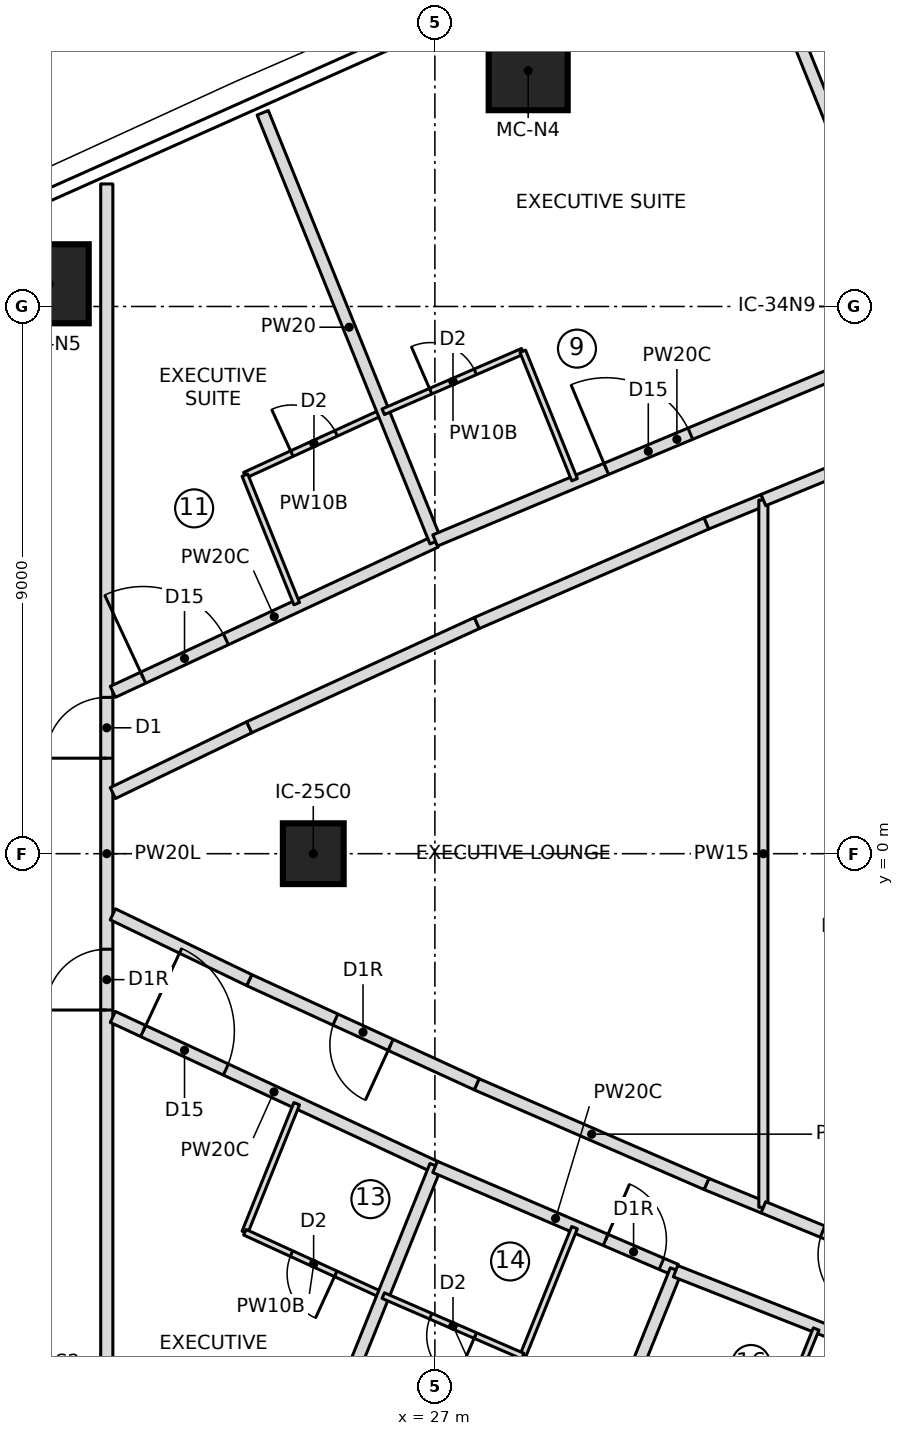
"""IFC4 building model, lengths in metres.
Left out: names, types, materials, properties, quantities, classifications, styles, units other than length and angle.
Written with IfcOpenShell. Run it as: python <this file> out.ifc"""

import sys

from ifc_helpers import new_model, si_unit, direction, frame, frame_2d, origin, origin_2d, place, context, subcontext, project, spatial, rectangle, extrude, element, fill, save


model = new_model("IFC4")
c1 = context("Model", 3, precision=1e-05, world=origin(), true_north=direction((0.0, 1.0)))
c2 = subcontext(c1, "Body", "Model", "MODEL_VIEW")
j1 = project(units=[si_unit("LENGTHUNIT", "METRE"), si_unit("PLANEANGLEUNIT", "RADIAN")], contexts=[c1])
p1 = place(None, origin())
s1 = spatial("IfcSite", under=j1, at=p1, CompositionType="ELEMENT")
p2 = place(p1, origin())
s2 = spatial("IfcBuilding", under=s1, at=p2, CompositionType="ELEMENT")
p3 = place(p2, frame((0.0, 0.0, 200.35)))
s3 = spatial("IfcBuildingStorey", under=s2, at=p3, CompositionType="ELEMENT", Elevation=200.35)
for number, where, z_axis, x_axis in (
    (1, (28.534, 12.878, 0.0), (0.0, 0.0, 1.0), (1.0, 0.0, 0.0)),
    (2, (20.657, 9.373, 0.0), (0.0, 0.0, 1.0), (1.0, 0.0, 0.0)),
):
    element("IfcColumn", number, at=place(p3, frame(where, z_axis=z_axis, x_axis=x_axis)), inside=s3, PredefinedType="COLUMN", context=c2, shape_type="SweptSolid", body=[
        extrude(rectangle(XDim=1.3, YDim=1.3, at=origin_2d()), origin(), (0.0, 0.0, 1.0), 3.55),
    ])
p4 = place(p3, frame((25.0, 0.0, 0.0), z_axis=(0.0, 0.0, 1.0), x_axis=(1.0, 0.0, 0.0)))
e3 = element("IfcColumn", 3, at=p4, inside=s3, PredefinedType="COLUMN", context=c2, shape_type="SweptSolid", body=[
    extrude(rectangle(XDim=1.0, YDim=1.0, at=origin_2d()), origin(), (0.0, 0.0, 1.0), 3.55),
])
p5 = place(p3, frame((21.604, -11.015, 0.0), z_axis=(0.0, 0.0, 1.0), x_axis=(0.0, 1.0, 0.0)))
e4 = element("IfcWall", 4, at=p5, inside=s3, PredefinedType="PARTITIONING", context=c2, shape_type="SweptSolid", body=[
    extrude(rectangle(XDim=22.031, YDim=0.2, at=frame_2d((11.015, 0.0))), origin(), (0.0, 0.0, 1.0), 3.25),
])
p6 = place(p5, frame((12.586, 0.0, 0.0)))
e5 = element("IfcOpeningElement", 5, at=p6, cuts=e4, PredefinedType="OPENING", context=c2, shape_type="SweptSolid", body=[
    extrude(rectangle(XDim=1.0, YDim=2.1, at=frame_2d((0.5, 1.05))), frame((0.0, 0.11, 0.0), z_axis=(0.0, -1.0, 0.0), x_axis=(1.0, 0.0, 0.0)), (0.0, 0.0, 1.0), 0.22),
])
p7 = place(p5, frame((8.444, 0.0, 0.0)))
e6 = element("IfcOpeningElement", 6, at=p7, cuts=e4, PredefinedType="OPENING", context=c2, shape_type="SweptSolid", body=[
    extrude(rectangle(XDim=1.0, YDim=2.1, at=frame_2d((0.5, 1.05))), frame((0.0, 0.11, 0.0), z_axis=(0.0, -1.0, 0.0), x_axis=(1.0, 0.0, 0.0)), (0.0, 0.0, 1.0), 0.22),
])
p8 = place(p3, frame((21.704, 2.663, 0.0), z_axis=(0.0, 0.0, 1.0), x_axis=(0.906619470853, 0.421949209112, 0.0)))
e7 = element("IfcWall", 7, at=p8, inside=s3, PredefinedType="PARTITIONING", context=c2, shape_type="SweptSolid", body=[
    extrude(rectangle(XDim=5.854, YDim=0.2, at=frame_2d((2.927, 0.0))), origin(), (0.0, 0.0, 1.0), 3.25),
])
p9 = place(p8, frame((0.55, 0.0, 0.0)))
e8 = element("IfcOpeningElement", 8, at=p9, cuts=e7, PredefinedType="OPENING", context=c2, shape_type="SweptSolid", body=[
    extrude(rectangle(XDim=1.5, YDim=2.1, at=frame_2d((0.75, 1.05))), frame((0.0, 0.11, 0.0), z_axis=(0.0, -1.0, 0.0), x_axis=(1.0, 0.0, 0.0)), (0.0, 0.0, 1.0), 0.22),
])
p10 = place(p3, frame((23.875, 6.226, 0.0), z_axis=(0.0, 0.0, 1.0), x_axis=(0.909145169949, 0.416479363183, 0.0)))
e9 = element("IfcWall", 9, at=p10, inside=s3, PredefinedType="PARTITIONING", context=c2, shape_type="SweptSolid", body=[
    extrude(rectangle(XDim=2.493, YDim=0.1, at=frame_2d((1.247, 0.0))), origin(), (0.0, 0.0, 1.0), 3.25),
])
p11 = place(p10, frame((0.85, 0.0, 0.0)))
e10 = element("IfcOpeningElement", 10, at=p11, cuts=e9, PredefinedType="OPENING", context=c2, shape_type="SweptSolid", body=[
    extrude(rectangle(XDim=0.8, YDim=2.1, at=frame_2d((0.4, 1.05))), frame((0.0, 0.06, 0.0), z_axis=(0.0, -1.0, 0.0), x_axis=(1.0, 0.0, 0.0)), (0.0, 0.0, 1.0), 0.12),
])
p12 = place(p3, frame((24.728, 4.112, 0.0), z_axis=(0.0, 0.0, 1.0), x_axis=(-0.373790023037, 0.927513352291, 0.0)))
e11 = element("IfcWall", 11, at=p12, inside=s3, PredefinedType="PARTITIONING", context=c2, shape_type="SweptSolid", body=[
    extrude(rectangle(XDim=2.28, YDim=0.1, at=frame_2d((1.14, 0.0))), origin(), (0.0, 0.0, 1.0), 3.25),
])
p13 = place(p3, frame((27.012, 5.133, 0.0), z_axis=(0.0, 0.0, 1.0), x_axis=(-0.373913547423, 0.927463562116, 0.0)))
e12 = element("IfcWall", 12, at=p13, inside=s3, PredefinedType="PARTITIONING", context=c2, shape_type="SweptSolid", body=[
    extrude(rectangle(XDim=7.604, YDim=0.2, at=frame_2d((3.802, 0.0))), origin(), (0.0, 0.0, 1.0), 3.25),
])
p14 = place(p3, frame((27.004, 5.151, 0.0), z_axis=(0.0, 0.0, 1.0), x_axis=(0.922490953728, 0.386018704586, 0.0)))
e13 = element("IfcWall", 13, at=p14, inside=s3, PredefinedType="PARTITIONING", context=c2, shape_type="SweptSolid", body=[
    extrude(rectangle(XDim=8.62, YDim=0.2, at=frame_2d((4.31, 0.0))), origin(), (0.0, 0.0, 1.0), 3.25),
])
p15 = place(p14, frame((3.05, 0.0, 0.0)))
e14 = element("IfcOpeningElement", 14, at=p15, cuts=e13, PredefinedType="OPENING", context=c2, shape_type="SweptSolid", body=[
    extrude(rectangle(XDim=1.5, YDim=2.1, at=frame_2d((0.75, 1.05))), frame((0.0, 0.11, 0.0), z_axis=(0.0, -1.0, 0.0), x_axis=(1.0, 0.0, 0.0)), (0.0, 0.0, 1.0), 0.22),
])
p16 = place(p3, frame((26.151, 7.268, 0.0), z_axis=(0.0, 0.0, 1.0), x_axis=(0.917378641232, 0.398015613526, 0.0)))
e15 = element("IfcWall", 15, at=p16, inside=s3, PredefinedType="PARTITIONING", context=c2, shape_type="SweptSolid", body=[
    extrude(rectangle(XDim=2.501, YDim=0.1, at=frame_2d((1.25, 0.0))), origin(), (0.0, 0.0, 1.0), 3.25),
])
p17 = place(p16, frame((0.85, 0.0, 0.0)))
e16 = element("IfcOpeningElement", 16, at=p17, cuts=e15, PredefinedType="OPENING", context=c2, shape_type="SweptSolid", body=[
    extrude(rectangle(XDim=0.8, YDim=2.1, at=frame_2d((0.4, 1.05))), frame((0.0, 0.06, 0.0), z_axis=(0.0, -1.0, 0.0), x_axis=(1.0, 0.0, 0.0)), (0.0, 0.0, 1.0), 0.12),
])
p18 = place(p3, frame((28.445, 8.263, 0.0), z_axis=(0.0, 0.0, 1.0), x_axis=(0.373902898623, -0.927467855185, 0.0)))
e17 = element("IfcWall", 17, at=p18, inside=s3, PredefinedType="PARTITIONING", context=c2, shape_type="SweptSolid", body=[
    extrude(rectangle(XDim=2.278, YDim=0.1, at=frame_2d((1.139, 0.0))), origin(), (0.0, 0.0, 1.0), 3.25),
])
p19 = place(p3, frame((34.956, 8.479, 0.0), z_axis=(0.0, 0.0, 1.0), x_axis=(-0.373881438439, 0.927476506436, 0.0)))
e18 = element("IfcWall", 18, at=p19, inside=s3, PredefinedType="PARTITIONING", context=c2, shape_type="SweptSolid", body=[
    extrude(rectangle(XDim=7.601, YDim=0.2, at=frame_2d((3.8, 0.0))), origin(), (0.0, 0.0, 1.0), 3.25),
])
p20 = place(p3, frame((21.704, -2.685, 0.0), z_axis=(0.0, 0.0, 1.0), x_axis=(0.906628613993, -0.421929563184, 0.0)))
e19 = element("IfcWall", 19, at=p20, inside=s3, PredefinedType="PARTITIONING", context=c2, shape_type="SweptSolid", body=[
    extrude(rectangle(XDim=5.846, YDim=0.2, at=frame_2d((2.923, 0.0))), origin(), (0.0, 0.0, 1.0), 3.25),
])
p21 = place(p20, frame((0.55, 0.0, 0.0)))
e20 = element("IfcOpeningElement", 20, at=p21, cuts=e19, PredefinedType="OPENING", context=c2, shape_type="SweptSolid", body=[
    extrude(rectangle(XDim=1.5, YDim=2.1, at=frame_2d((0.75, 1.05))), frame((0.0, 0.11, 0.0), z_axis=(0.0, -1.0, 0.0), x_axis=(1.0, 0.0, 0.0)), (0.0, 0.0, 1.0), 0.22),
])
p22 = place(p3, frame((23.875, -6.226, 0.0), z_axis=(0.0, 0.0, 1.0), x_axis=(0.373790023037, 0.927513352291, 0.0)))
e21 = element("IfcWall", 21, at=p22, inside=s3, PredefinedType="PARTITIONING", context=c2, shape_type="SweptSolid", body=[
    extrude(rectangle(XDim=2.28, YDim=0.1, at=frame_2d((1.14, 0.0))), origin(), (0.0, 0.0, 1.0), 3.25),
])
p23 = place(p3, frame((26.142, -7.264, 0.0), z_axis=(0.0, 0.0, 1.0), x_axis=(-0.909145169949, 0.416479363183, 0.0)))
e22 = element("IfcWall", 22, at=p23, inside=s3, PredefinedType="PARTITIONING", context=c2, shape_type="SweptSolid", body=[
    extrude(rectangle(XDim=2.493, YDim=0.1, at=frame_2d((1.247, 0.0))), origin(), (0.0, 0.0, 1.0), 3.25),
])
p24 = place(p23, frame((0.85, 0.0, 0.0)))
e23 = element("IfcOpeningElement", 23, at=p24, cuts=e22, PredefinedType="OPENING", context=c2, shape_type="SweptSolid", body=[
    extrude(rectangle(XDim=0.8, YDim=2.1, at=frame_2d((0.4, 1.05))), frame((0.0, 0.06, 0.0), z_axis=(0.0, -1.0, 0.0), x_axis=(1.0, 0.0, 0.0)), (0.0, 0.0, 1.0), 0.12),
])
p25 = place(p3, frame((24.168, -12.185, 0.0), z_axis=(0.0, 0.0, 1.0), x_axis=(0.373913547423, 0.927463562116, 0.0)))
e24 = element("IfcWall", 24, at=p25, inside=s3, PredefinedType="PARTITIONING", context=c2, shape_type="SweptSolid", body=[
    extrude(rectangle(XDim=7.604, YDim=0.2, at=frame_2d((3.802, 0.0))), origin(), (0.0, 0.0, 1.0), 3.25),
])
p26 = place(p3, frame((27.004, -5.151, 0.0), z_axis=(0.0, 0.0, 1.0), x_axis=(0.919259282109, -0.393652603519, 0.0)))
e25 = element("IfcWall", 25, at=p26, inside=s3, PredefinedType="PARTITIONING", context=c2, shape_type="SweptSolid", body=[
    extrude(rectangle(XDim=4.309, YDim=0.2, at=frame_2d((2.155, 0.0))), origin(), (0.0, 0.0, 1.0), 3.25),
])
p27 = place(p26, frame((3.05, 0.0, 0.0)))
e26 = element("IfcOpeningElement", 26, at=p27, cuts=e25, PredefinedType="OPENING", context=c2, shape_type="SweptSolid", body=[
    extrude(rectangle(XDim=1.0, YDim=2.1, at=frame_2d((0.5, 1.05))), frame((0.0, 0.11, 0.0), z_axis=(0.0, -1.0, 0.0), x_axis=(1.0, 0.0, 0.0)), (0.0, 0.0, 1.0), 0.22),
])
p28 = place(p3, frame((29.297, -6.151, 0.0), z_axis=(0.0, 0.0, 1.0), x_axis=(-0.373902898623, -0.927467855185, 0.0)))
e27 = element("IfcWall", 27, at=p28, inside=s3, PredefinedType="PARTITIONING", context=c2, shape_type="SweptSolid", body=[
    extrude(rectangle(XDim=2.278, YDim=0.1, at=frame_2d((1.139, 0.0))), origin(), (0.0, 0.0, 1.0), 3.25),
])
p29 = place(p3, frame((28.445, -8.263, 0.0), z_axis=(0.0, 0.0, 1.0), x_axis=(-0.917378641232, 0.398015613526, 0.0)))
e28 = element("IfcWall", 28, at=p29, inside=s3, PredefinedType="PARTITIONING", context=c2, shape_type="SweptSolid", body=[
    extrude(rectangle(XDim=2.501, YDim=0.1, at=frame_2d((1.25, 0.0))), origin(), (0.0, 0.0, 1.0), 3.25),
])
p30 = place(p29, frame((0.85, 0.0, 0.0)))
e29 = element("IfcOpeningElement", 29, at=p30, cuts=e28, PredefinedType="OPENING", context=c2, shape_type="SweptSolid", body=[
    extrude(rectangle(XDim=0.8, YDim=2.1, at=frame_2d((0.4, 1.05))), frame((0.0, 0.06, 0.0), z_axis=(0.0, -1.0, 0.0), x_axis=(1.0, 0.0, 0.0)), (0.0, 0.0, 1.0), 0.12),
])
p31 = place(p3, frame((28.124, -13.897, 0.0), z_axis=(0.0, 0.0, 1.0), x_axis=(0.373876084216, 0.927478664796, 0.0)))
e30 = element("IfcWall", 30, at=p31, inside=s3, PredefinedType="PARTITIONING", context=c2, shape_type="SweptSolid", body=[
    extrude(rectangle(XDim=7.6, YDim=0.2, at=frame_2d((3.8, 0.0))), origin(), (0.0, 0.0, 1.0), 3.25),
])
p32 = place(p3, frame((30.958, -6.866, 0.0), z_axis=(0.0, 0.0, 1.0), x_axis=(0.93040517394, -0.366532689274, 0.0)))
e31 = element("IfcWall", 31, at=p32, inside=s3, PredefinedType="PARTITIONING", context=c2, shape_type="SweptSolid", body=[
    extrude(rectangle(XDim=8.622, YDim=0.2, at=frame_2d((4.311, 0.0))), origin(), (0.0, 0.0, 1.0), 3.25),
])
p33 = place(p32, frame((4.25, 0.0, 0.0)))
e32 = element("IfcOpeningElement", 32, at=p33, cuts=e31, PredefinedType="OPENING", context=c2, shape_type="SweptSolid", body=[
    extrude(rectangle(XDim=1.5, YDim=2.1, at=frame_2d((0.75, 1.05))), frame((0.0, 0.11, 0.0), z_axis=(0.0, -1.0, 0.0), x_axis=(1.0, 0.0, 0.0)), (0.0, 0.0, 1.0), 0.22),
])
p34 = place(p3, frame((33.27, -7.818, 0.0), z_axis=(0.0, 0.0, 1.0), x_axis=(-0.373847853912, -0.927490044219, 0.0)))
e33 = element("IfcWall", 33, at=p34, inside=s3, PredefinedType="PARTITIONING", context=c2, shape_type="SweptSolid", body=[
    extrude(rectangle(XDim=2.277, YDim=0.1, at=frame_2d((1.139, 0.0))), origin(), (0.0, 0.0, 1.0), 3.25),
])
p35 = place(p3, frame((27.69, -3.793, 0.0), z_axis=(0.0, 0.0, 1.0), x_axis=(-0.909180834404, 0.416401501382, 0.0)))
e34 = element("IfcWall", 34, at=p35, inside=s3, PredefinedType="PARTITIONING", context=c2, shape_type="SweptSolid", body=[
    extrude(rectangle(XDim=4.117, YDim=0.2, at=frame_2d((2.059, 0.0))), origin(), (0.0, 0.0, 1.0), 3.25),
])
p36 = place(p35, frame((1.559, 0.0, 0.0)))
e35 = element("IfcOpeningElement", 35, at=p36, cuts=e34, PredefinedType="OPENING", context=c2, shape_type="SweptSolid", body=[
    extrude(rectangle(XDim=1.0, YDim=2.1, at=frame_2d((0.5, 1.05))), frame((0.0, 0.11, 0.0), z_axis=(0.0, -1.0, 0.0), x_axis=(1.0, 0.0, 0.0)), (0.0, 0.0, 1.0), 0.22),
])
p37 = place(p3, frame((32.402, -5.816, 0.0), z_axis=(0.0, 0.0, 1.0), x_axis=(-0.925212079844, 0.379450401648, 0.0)))
e36 = element("IfcWall", 36, at=p37, inside=s3, PredefinedType="PARTITIONING", context=c2, shape_type="SweptSolid", body=[
    extrude(rectangle(XDim=1.011, YDim=0.2, at=frame_2d((0.506, 0.0))), origin(), (0.0, 0.0, 1.0), 3.25),
])
p38 = place(p3, frame((31.467, -5.432, 0.0), z_axis=(0.0, 0.0, 1.0), x_axis=(-0.917375244839, 0.398023441717, 0.0)))
e37 = element("IfcWall", 37, at=p38, inside=s3, PredefinedType="PARTITIONING", context=c2, shape_type="SweptSolid", body=[
    extrude(rectangle(XDim=4.117, YDim=0.2, at=frame_2d((2.059, 0.0))), origin(), (0.0, 0.0, 1.0), 3.25),
])
for number, where, z_axis, x_axis in (
    (38, (23.947, -2.079, 0.0), (0.0, 0.0, 1.0), (-0.901, 0.435, 0.0)),
    (39, (21.704, 0.997, 0.0), (0.0, 0.0, 1.0), (0.901, 0.435, 0.0)),
):
    element("IfcWall", number, at=place(p3, frame(where, z_axis=z_axis, x_axis=x_axis)), inside=s3, PredefinedType="PARTITIONING", context=c2, shape_type="SweptSolid", body=[
        extrude(rectangle(XDim=2.49, YDim=0.2, at=frame_2d((1.245, 0.0))), origin(), (0.0, 0.0, 1.0), 3.25),
    ])
p39 = place(p3, frame((23.947, 2.079, 0.0), z_axis=(0.0, 0.0, 1.0), x_axis=(0.909180834404, 0.416401501382, 0.0)))
e40 = element("IfcWall", 40, at=p39, inside=s3, PredefinedType="PARTITIONING", context=c2, shape_type="SweptSolid", body=[
    extrude(rectangle(XDim=4.117, YDim=0.2, at=frame_2d((2.059, 0.0))), origin(), (0.0, 0.0, 1.0), 3.25),
])
p40 = place(p3, frame((27.69, 3.793, 0.0), z_axis=(0.0, 0.0, 1.0), x_axis=(0.917375244839, 0.398023441717, 0.0)))
e41 = element("IfcWall", 41, at=p40, inside=s3, PredefinedType="PARTITIONING", context=c2, shape_type="SweptSolid", body=[
    extrude(rectangle(XDim=4.117, YDim=0.2, at=frame_2d((2.059, 0.0))), origin(), (0.0, 0.0, 1.0), 3.25),
])
p41 = place(p3, frame((31.467, 5.432, 0.0), z_axis=(0.0, 0.0, 1.0), x_axis=(0.925212079844, 0.379450401648, 0.0)))
e42 = element("IfcWall", 42, at=p41, inside=s3, PredefinedType="PARTITIONING", context=c2, shape_type="SweptSolid", body=[
    extrude(rectangle(XDim=1.011, YDim=0.2, at=frame_2d((0.506, 0.0))), origin(), (0.0, 0.0, 1.0), 3.25),
])
p42 = place(p3, frame((32.402, -5.816, 0.0), z_axis=(0.0, 0.0, 1.0), x_axis=(0.0, 1.0, 0.0)))
e43 = element("IfcWall", 43, at=p42, inside=s3, PredefinedType="PARTITIONING", context=c2, shape_type="SweptSolid", body=[
    extrude(rectangle(XDim=11.632, YDim=0.15, at=frame_2d((5.816, 0.0))), origin(), (0.0, 0.0, 1.0), 3.25),
])
p43 = place(p3, frame((35.276, -6.994, 0.0), z_axis=(0.0, 0.0, 1.0), x_axis=(-0.925204713675, 0.379468362045, 0.0)))
e44 = element("IfcWall", 44, at=p43, inside=s3, PredefinedType="PARTITIONING", context=c2, shape_type="SweptSolid", body=[
    extrude(rectangle(XDim=3.105, YDim=0.2, at=frame_2d((1.553, 0.0))), origin(), (0.0, 0.0, 1.0), 3.25),
])
p44 = place(p43, frame((1.053, 0.0, 0.0)))
e45 = element("IfcOpeningElement", 45, at=p44, cuts=e44, PredefinedType="OPENING", context=c2, shape_type="SweptSolid", body=[
    extrude(rectangle(XDim=1.0, YDim=2.1, at=frame_2d((0.5, 1.05))), frame((0.0, 0.11, 0.0), z_axis=(0.0, -1.0, 0.0), x_axis=(1.0, 0.0, 0.0)), (0.0, 0.0, 1.0), 0.22),
])
p45 = place(p3, frame((32.402, 5.816, 0.0), z_axis=(0.0, 0.0, 1.0), x_axis=(0.925204713675, 0.379468362045, 0.0)))
e46 = element("IfcWall", 46, at=p45, inside=s3, PredefinedType="PARTITIONING", context=c2, shape_type="SweptSolid", body=[
    extrude(rectangle(XDim=3.105, YDim=0.2, at=frame_2d((1.553, 0.0))), origin(), (0.0, 0.0, 1.0), 3.25),
])
p46 = place(p6, origin())
e47 = element("IfcDoor", 47, at=p46, inside=s3, OperationType="SINGLE_SWING_LEFT", PredefinedType="DOOR", context=c2, shape_type="SweptSolid", body=[
    extrude(rectangle(XDim=1.0, YDim=2.1, at=frame_2d((0.5, 1.05))), frame((0.0, 0.025, 0.0), z_axis=(0.0, -1.0, 0.0), x_axis=(1.0, 0.0, 0.0)), (0.0, 0.0, 1.0), 0.05),
])
fill(e5, e47)
p47 = place(p7, origin())
e48 = element("IfcDoor", 48, at=p47, inside=s3, OperationType="SINGLE_SWING_RIGHT", PredefinedType="DOOR", context=c2, shape_type="SweptSolid", body=[
    extrude(rectangle(XDim=1.0, YDim=2.1, at=frame_2d((0.5, 1.05))), frame((0.0, 0.025, 0.0), z_axis=(0.0, -1.0, 0.0), x_axis=(1.0, 0.0, 0.0)), (0.0, 0.0, 1.0), 0.05),
])
fill(e6, e48)
p48 = place(p11, origin())
e49 = element("IfcDoor", 49, at=p48, inside=s3, OperationType="SINGLE_SWING_LEFT", PredefinedType="DOOR", context=c2, shape_type="SweptSolid", body=[
    extrude(rectangle(XDim=0.8, YDim=2.1, at=frame_2d((0.4, 1.05))), frame((0.0, 0.025, 0.0), z_axis=(0.0, -1.0, 0.0), x_axis=(1.0, 0.0, 0.0)), (0.0, 0.0, 1.0), 0.05),
])
fill(e10, e49)
p49 = place(p9, origin())
e50 = element("IfcDoor", 50, at=p49, inside=s3, OperationType="DOUBLE_DOOR_SINGLE_SWING", PredefinedType="DOOR", context=c2, shape_type="SweptSolid", body=[
    extrude(rectangle(XDim=1.5, YDim=2.1, at=frame_2d((0.75, 1.05))), frame((0.0, 0.025, 0.0), z_axis=(0.0, -1.0, 0.0), x_axis=(1.0, 0.0, 0.0)), (0.0, 0.0, 1.0), 0.05),
])
fill(e8, e50)
p50 = place(p17, origin())
e51 = element("IfcDoor", 51, at=p50, inside=s3, OperationType="SINGLE_SWING_LEFT", PredefinedType="DOOR", context=c2, shape_type="SweptSolid", body=[
    extrude(rectangle(XDim=0.8, YDim=2.1, at=frame_2d((0.4, 1.05))), frame((0.0, 0.025, 0.0), z_axis=(0.0, -1.0, 0.0), x_axis=(1.0, 0.0, 0.0)), (0.0, 0.0, 1.0), 0.05),
])
fill(e16, e51)
p51 = place(p15, origin())
e52 = element("IfcDoor", 52, at=p51, inside=s3, OperationType="DOUBLE_DOOR_SINGLE_SWING", PredefinedType="DOOR", context=c2, shape_type="SweptSolid", body=[
    extrude(rectangle(XDim=1.5, YDim=2.1, at=frame_2d((0.75, 1.05))), frame((0.0, 0.025, 0.0), z_axis=(0.0, -1.0, 0.0), x_axis=(1.0, 0.0, 0.0)), (0.0, 0.0, 1.0), 0.05),
])
fill(e14, e52)
p52 = place(p24, origin())
e53 = element("IfcDoor", 53, at=p52, inside=s3, OperationType="SINGLE_SWING_LEFT", PredefinedType="DOOR", context=c2, shape_type="SweptSolid", body=[
    extrude(rectangle(XDim=0.8, YDim=2.1, at=frame_2d((0.4, 1.05))), frame((0.0, 0.025, 0.0), z_axis=(0.0, -1.0, 0.0), x_axis=(1.0, 0.0, 0.0)), (0.0, 0.0, 1.0), 0.05),
])
fill(e23, e53)
p53 = place(p21, origin())
e54 = element("IfcDoor", 54, at=p53, inside=s3, OperationType="DOUBLE_DOOR_SINGLE_SWING", PredefinedType="DOOR", context=c2, shape_type="SweptSolid", body=[
    extrude(rectangle(XDim=1.5, YDim=2.1, at=frame_2d((0.75, 1.05))), frame((0.0, 0.025, 0.0), z_axis=(0.0, -1.0, 0.0), x_axis=(1.0, 0.0, 0.0)), (0.0, 0.0, 1.0), 0.05),
])
fill(e20, e54)
p54 = place(p30, origin())
e55 = element("IfcDoor", 55, at=p54, inside=s3, OperationType="SINGLE_SWING_LEFT", PredefinedType="DOOR", context=c2, shape_type="SweptSolid", body=[
    extrude(rectangle(XDim=0.8, YDim=2.1, at=frame_2d((0.4, 1.05))), frame((0.0, 0.025, 0.0), z_axis=(0.0, -1.0, 0.0), x_axis=(1.0, 0.0, 0.0)), (0.0, 0.0, 1.0), 0.05),
])
fill(e29, e55)
p55 = place(p27, origin())
e56 = element("IfcDoor", 56, at=p55, inside=s3, OperationType="SINGLE_SWING_RIGHT", PredefinedType="DOOR", context=c2, shape_type="SweptSolid", body=[
    extrude(rectangle(XDim=1.0, YDim=2.1, at=frame_2d((0.5, 1.05))), frame((0.0, 0.025, 0.0), z_axis=(0.0, -1.0, 0.0), x_axis=(1.0, 0.0, 0.0)), (0.0, 0.0, 1.0), 0.05),
])
fill(e26, e56)
p56 = place(p36, origin())
e57 = element("IfcDoor", 57, at=p56, inside=s3, OperationType="SINGLE_SWING_RIGHT", PredefinedType="DOOR", context=c2, shape_type="SweptSolid", body=[
    extrude(rectangle(XDim=1.0, YDim=2.1, at=frame_2d((0.5, 1.05))), frame((0.0, 0.025, 0.0), z_axis=(0.0, -1.0, 0.0), x_axis=(1.0, 0.0, 0.0)), (0.0, 0.0, 1.0), 0.05),
])
fill(e35, e57)
p57 = place(p44, origin())
e58 = element("IfcDoor", 58, at=p57, inside=s3, OperationType="SINGLE_SWING_LEFT", PredefinedType="DOOR", context=c2, shape_type="SweptSolid", body=[
    extrude(rectangle(XDim=1.0, YDim=2.1, at=frame_2d((0.5, 1.05))), frame((0.0, 0.025, 0.0), z_axis=(0.0, -1.0, 0.0), x_axis=(1.0, 0.0, 0.0)), (0.0, 0.0, 1.0), 0.05),
])
fill(e45, e58)
save(model, sys.argv[1])
